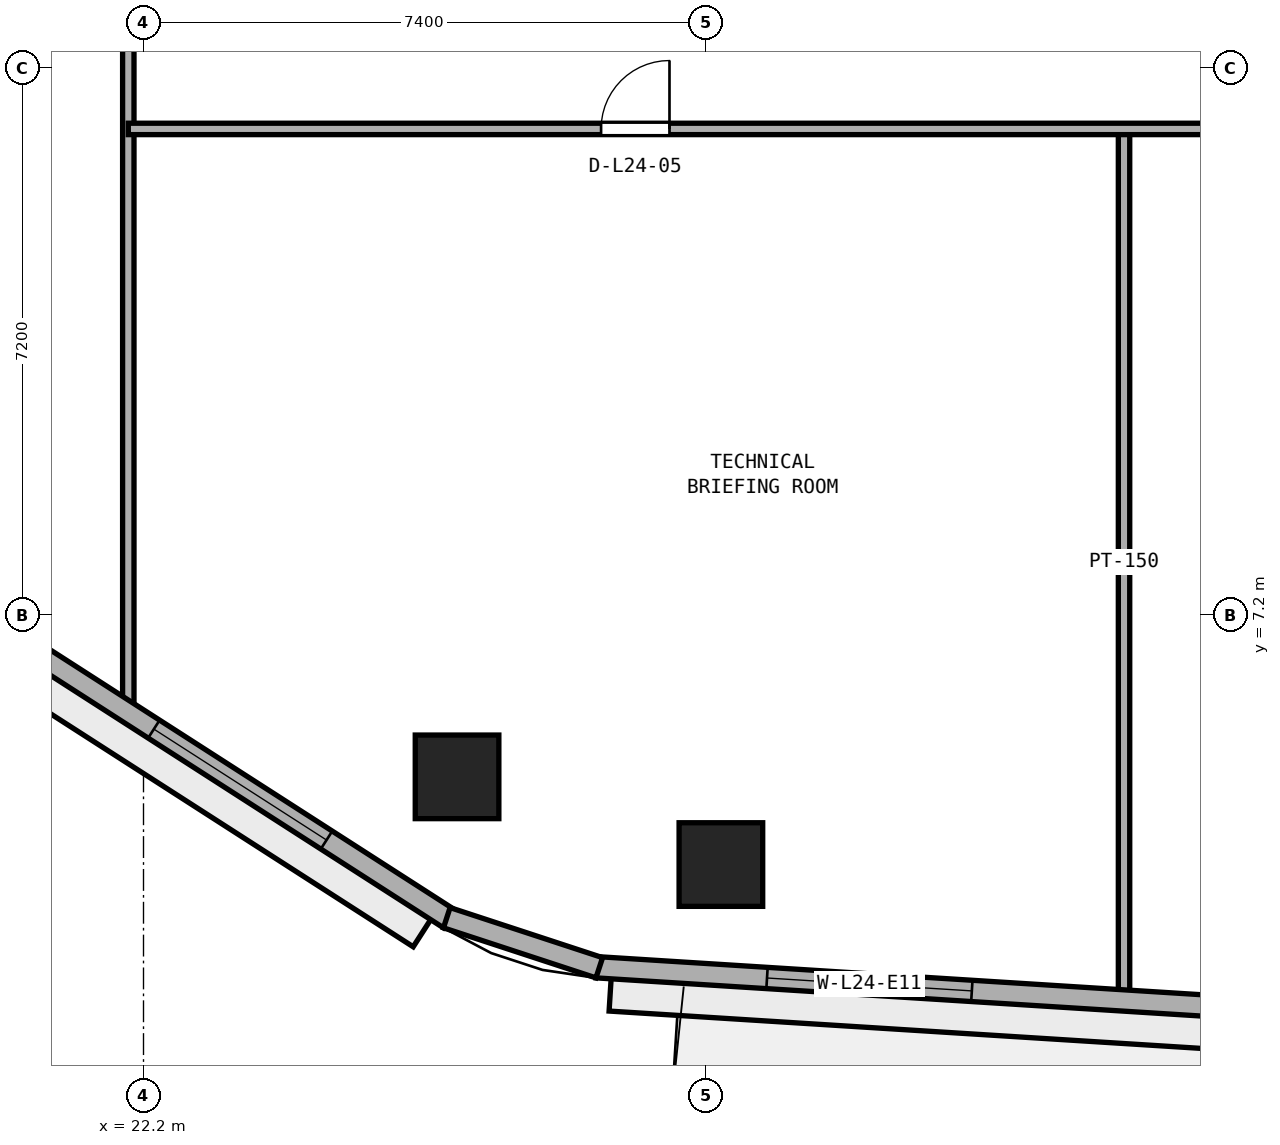
"""IFC4 building model, lengths in metres.
Left out: names, types, materials, properties, quantities, classifications, styles, units other than length and angle.
Written with IfcOpenShell. Run it as: python <this file> out.ifc"""

import sys

from ifc_helpers import new_model, si_unit, direction, frame, frame_2d, origin, origin_2d, place, context, subcontext, project, spatial, rectangle, extrude, element, fill, save


model = new_model("IFC4")
c1 = context("Model", 3, precision=1e-05, world=origin(), true_north=direction((0.0, 1.0)))
c2 = subcontext(c1, "Body", "Model", "MODEL_VIEW")
j1 = project(units=[si_unit("LENGTHUNIT", "METRE"), si_unit("PLANEANGLEUNIT", "RADIAN")], contexts=[c1])
p1 = place(None, origin())
s1 = spatial("IfcSite", under=j1, at=p1, CompositionType="ELEMENT")
p2 = place(p1, origin())
s2 = spatial("IfcBuilding", under=s1, at=p2, CompositionType="ELEMENT")
p3 = place(p2, frame((0.0, 0.0, 97.2)))
s3 = spatial("IfcBuildingStorey", under=s2, at=p3, CompositionType="ELEMENT", Elevation=97.2)
for number, where, z_axis, x_axis in (
    (1, (29.796, 3.922, 0.0), (0.0, 0.0, 1.0), (1.0, 0.0, 0.0)),
    (2, (26.325, 5.076, 0.0), (0.0, 0.0, 1.0), (1.0, 0.0, 0.0)),
):
    element("IfcColumn", number, at=place(p3, frame(where, z_axis=z_axis, x_axis=x_axis)), inside=s3, PredefinedType="COLUMN", context=c2, shape_type="SweptSolid", body=[
        extrude(rectangle(XDim=1.1, YDim=1.1, at=origin_2d()), origin(), (0.0, 0.0, 1.0), 3.8),
    ])
p4 = place(p3, frame((35.1, 2.198, 0.0), z_axis=(0.0, 0.0, 1.0), x_axis=(0.0, 1.0, 0.0)))
e3 = element("IfcWall", 3, at=p4, inside=s3, PredefinedType="PARTITIONING", context=c2, shape_type="SweptSolid", body=[
    extrude(rectangle(XDim=11.402, YDim=0.15, at=frame_2d((5.701, 0.0))), origin(), (0.0, 0.0, 1.0), 3.525),
])
p5 = place(p3, frame((22.0, 5.894, 0.0), z_axis=(0.0, 0.0, 1.0), x_axis=(0.0, 1.0, 0.0)))
e4 = element("IfcWall", 4, at=p5, inside=s3, PredefinedType="PARTITIONING", context=c2, shape_type="SweptSolid", body=[
    extrude(rectangle(XDim=30.906, YDim=0.15, at=frame_2d((15.453, 0.0))), origin(), (0.0, 0.0, 1.0), 3.525),
])
p6 = place(p5, frame((12.156, 0.0, 0.0)))
e5 = element("IfcOpeningElement", 5, at=p6, cuts=e4, PredefinedType="OPENING", context=c2, shape_type="SweptSolid", body=[
    extrude(rectangle(XDim=0.9, YDim=2.1, at=frame_2d((0.45, 1.05))), frame((0.0, 0.085, 0.0), z_axis=(0.0, -1.0, 0.0), x_axis=(1.0, 0.0, 0.0)), (0.0, 0.0, 1.0), 0.17),
])
p7 = place(p5, frame((20.806, 0.0, 0.0)))
e6 = element("IfcOpeningElement", 6, at=p7, cuts=e4, PredefinedType="OPENING", context=c2, shape_type="SweptSolid", body=[
    extrude(rectangle(XDim=0.9, YDim=2.1, at=frame_2d((0.45, 1.05))), frame((0.0, 0.085, 0.0), z_axis=(0.0, -1.0, 0.0), x_axis=(1.0, 0.0, 0.0)), (0.0, 0.0, 1.0), 0.17),
])
p8 = place(p5, frame((25.731, 0.0, 0.0)))
e7 = element("IfcOpeningElement", 7, at=p8, cuts=e4, PredefinedType="OPENING", context=c2, shape_type="SweptSolid", body=[
    extrude(rectangle(XDim=1.0, YDim=2.12, at=frame_2d((0.5, 1.06))), frame((0.0, 0.085, 0.0), z_axis=(0.0, -1.0, 0.0), x_axis=(1.0, 0.0, 0.0)), (0.0, 0.0, 1.0), 0.17),
])
p9 = place(p3, frame((22.0, 13.6, 0.0), z_axis=(0.0, 0.0, 1.0), x_axis=(1.0, 0.0, 0.0)))
e8 = element("IfcWall", 8, at=p9, inside=s3, PredefinedType="PARTITIONING", context=c2, shape_type="SweptSolid", body=[
    extrude(rectangle(XDim=30.0, YDim=0.15, at=frame_2d((15.0, 0.0))), origin(), (0.0, 0.0, 1.0), 3.525),
])
p10 = place(p9, frame((6.22, 0.0, 0.0)))
e9 = element("IfcOpeningElement", 9, at=p10, cuts=e8, PredefinedType="OPENING", context=c2, shape_type="SweptSolid", body=[
    extrude(rectangle(XDim=0.9, YDim=2.1, at=frame_2d((0.45, 1.05))), frame((0.0, 0.085, 0.0), z_axis=(0.0, -1.0, 0.0), x_axis=(1.0, 0.0, 0.0)), (0.0, 0.0, 1.0), 0.17),
])
p11 = place(p9, frame((20.98, 0.0, 0.0)))
e10 = element("IfcOpeningElement", 10, at=p11, cuts=e8, PredefinedType="OPENING", context=c2, shape_type="SweptSolid", body=[
    extrude(rectangle(XDim=0.9, YDim=2.1, at=frame_2d((0.45, 1.05))), frame((0.0, 0.085, 0.0), z_axis=(0.0, -1.0, 0.0), x_axis=(1.0, 0.0, 0.0)), (0.0, 0.0, 1.0), 0.17),
])
p12 = place(p3, frame((28.161, 2.571, 0.0), z_axis=(0.0, 0.0, 1.0), x_axis=(0.998017288298, -0.06294038654, 0.0)))
e11 = element("IfcWall", 11, at=p12, inside=s3, PredefinedType="STANDARD", context=c2, shape_type="SweptSolid", body=[
    extrude(rectangle(XDim=19.577, YDim=0.28, at=frame_2d((9.789, 0.0))), origin(), (0.0, 0.0, 1.0), 3.525),
])
p13 = place(p12, frame((9.239, 0.0, 0.0)))
e12 = element("IfcOpeningElement", 12, at=p13, cuts=e11, PredefinedType="OPENING", context=c2, shape_type="SweptSolid", body=[
    extrude(rectangle(XDim=1.1, YDim=2.2, at=frame_2d((0.55, 1.1))), frame((0.0, 0.15, 0.0), z_axis=(0.0, -1.0, 0.0), x_axis=(1.0, 0.0, 0.0)), (0.0, 0.0, 1.0), 0.3),
])
p14 = place(p12, frame((2.246, 0.0, 0.9)))
e13 = element("IfcOpeningElement", 13, at=p14, cuts=e11, PredefinedType="OPENING", context=c2, shape_type="SweptSolid", body=[
    extrude(rectangle(XDim=2.7, YDim=1.75, at=frame_2d((1.35, 0.875))), frame((0.0, 0.15, 0.0), z_axis=(0.0, -1.0, 0.0), x_axis=(1.0, 0.0, 0.0)), (0.0, 0.0, 1.0), 0.3),
])
p15 = place(p12, frame((14.631, 0.0, 0.9)))
e14 = element("IfcOpeningElement", 14, at=p15, cuts=e11, PredefinedType="OPENING", context=c2, shape_type="SweptSolid", body=[
    extrude(rectangle(XDim=2.7, YDim=1.75, at=frame_2d((1.35, 0.875))), frame((0.0, 0.15, 0.0), z_axis=(0.0, -1.0, 0.0), x_axis=(1.0, 0.0, 0.0)), (0.0, 0.0, 1.0), 0.3),
])
p16 = place(p3, frame((11.405, 12.728, 0.0), z_axis=(0.0, 0.0, 1.0), x_axis=(0.841304564637, -0.540561402175, 0.0)))
e15 = element("IfcWall", 15, at=p16, inside=s3, PredefinedType="STANDARD", context=c2, shape_type="SweptSolid", body=[
    extrude(rectangle(XDim=17.612, YDim=0.28, at=frame_2d((8.806, 0.0))), origin(), (0.0, 0.0, 1.0), 3.525),
])
p17 = place(p16, frame((1.919, 0.0, 0.9)))
e16 = element("IfcOpeningElement", 16, at=p17, cuts=e15, PredefinedType="OPENING", context=c2, shape_type="SweptSolid", body=[
    extrude(rectangle(XDim=2.7, YDim=1.75, at=frame_2d((1.35, 0.875))), frame((0.0, 0.15, 0.0), z_axis=(0.0, -1.0, 0.0), x_axis=(1.0, 0.0, 0.0)), (0.0, 0.0, 1.0), 0.3),
])
p18 = place(p16, frame((7.456, 0.0, 0.9)))
e17 = element("IfcOpeningElement", 17, at=p18, cuts=e15, PredefinedType="OPENING", context=c2, shape_type="SweptSolid", body=[
    extrude(rectangle(XDim=2.7, YDim=1.75, at=frame_2d((1.35, 0.875))), frame((0.0, 0.15, 0.0), z_axis=(0.0, -1.0, 0.0), x_axis=(1.0, 0.0, 0.0)), (0.0, 0.0, 1.0), 0.3),
])
p19 = place(p16, frame((12.993, 0.0, 0.9)))
e18 = element("IfcOpeningElement", 18, at=p19, cuts=e15, PredefinedType="OPENING", context=c2, shape_type="SweptSolid", body=[
    extrude(rectangle(XDim=2.7, YDim=1.75, at=frame_2d((1.35, 0.875))), frame((0.0, 0.15, 0.0), z_axis=(0.0, -1.0, 0.0), x_axis=(1.0, 0.0, 0.0)), (0.0, 0.0, 1.0), 0.3),
])
p20 = place(p3, frame((26.19, 3.223, 0.0), z_axis=(0.0, 0.0, 1.0), x_axis=(0.95016442175, -0.311749212734, 0.0)))
e19 = element("IfcWall", 19, at=p20, inside=s3, PredefinedType="STANDARD", context=c2, shape_type="SweptSolid", body=[
    extrude(rectangle(XDim=2.111, YDim=0.28, at=frame_2d((1.056, 0.0))), origin(), (0.0, 0.0, 1.0), 3.525),
])
p21 = place(p10, origin())
e20 = element("IfcDoor", 20, at=p21, inside=s3, OperationType="SINGLE_SWING_RIGHT", PredefinedType="DOOR", context=c2, shape_type="SweptSolid", body=[
    extrude(rectangle(XDim=0.9, YDim=2.1, at=frame_2d((0.45, 1.05))), frame((0.0, 0.025, 0.0), z_axis=(0.0, -1.0, 0.0), x_axis=(1.0, 0.0, 0.0)), (0.0, 0.0, 1.0), 0.05),
])
fill(e9, e20)
p22 = place(p14, origin())
e21 = element("IfcWindow", 21, at=p22, inside=s3, PartitioningType="SINGLE_PANEL", PredefinedType="WINDOW", context=c2, shape_type="SweptSolid", body=[
    extrude(rectangle(XDim=2.7, YDim=1.75, at=frame_2d((1.35, 0.875))), frame((0.0, 0.03, 0.0), z_axis=(0.0, -1.0, 0.0), x_axis=(1.0, 0.0, 0.0)), (0.0, 0.0, 1.0), 0.06),
])
fill(e13, e21)
p23 = place(p19, origin())
e22 = element("IfcWindow", 22, at=p23, inside=s3, PartitioningType="SINGLE_PANEL", PredefinedType="WINDOW", context=c2, shape_type="SweptSolid", body=[
    extrude(rectangle(XDim=2.7, YDim=1.75, at=frame_2d((1.35, 0.875))), frame((0.0, 0.03, 0.0), z_axis=(0.0, -1.0, 0.0), x_axis=(1.0, 0.0, 0.0)), (0.0, 0.0, 1.0), 0.06),
])
fill(e18, e22)
save(model, sys.argv[1])
